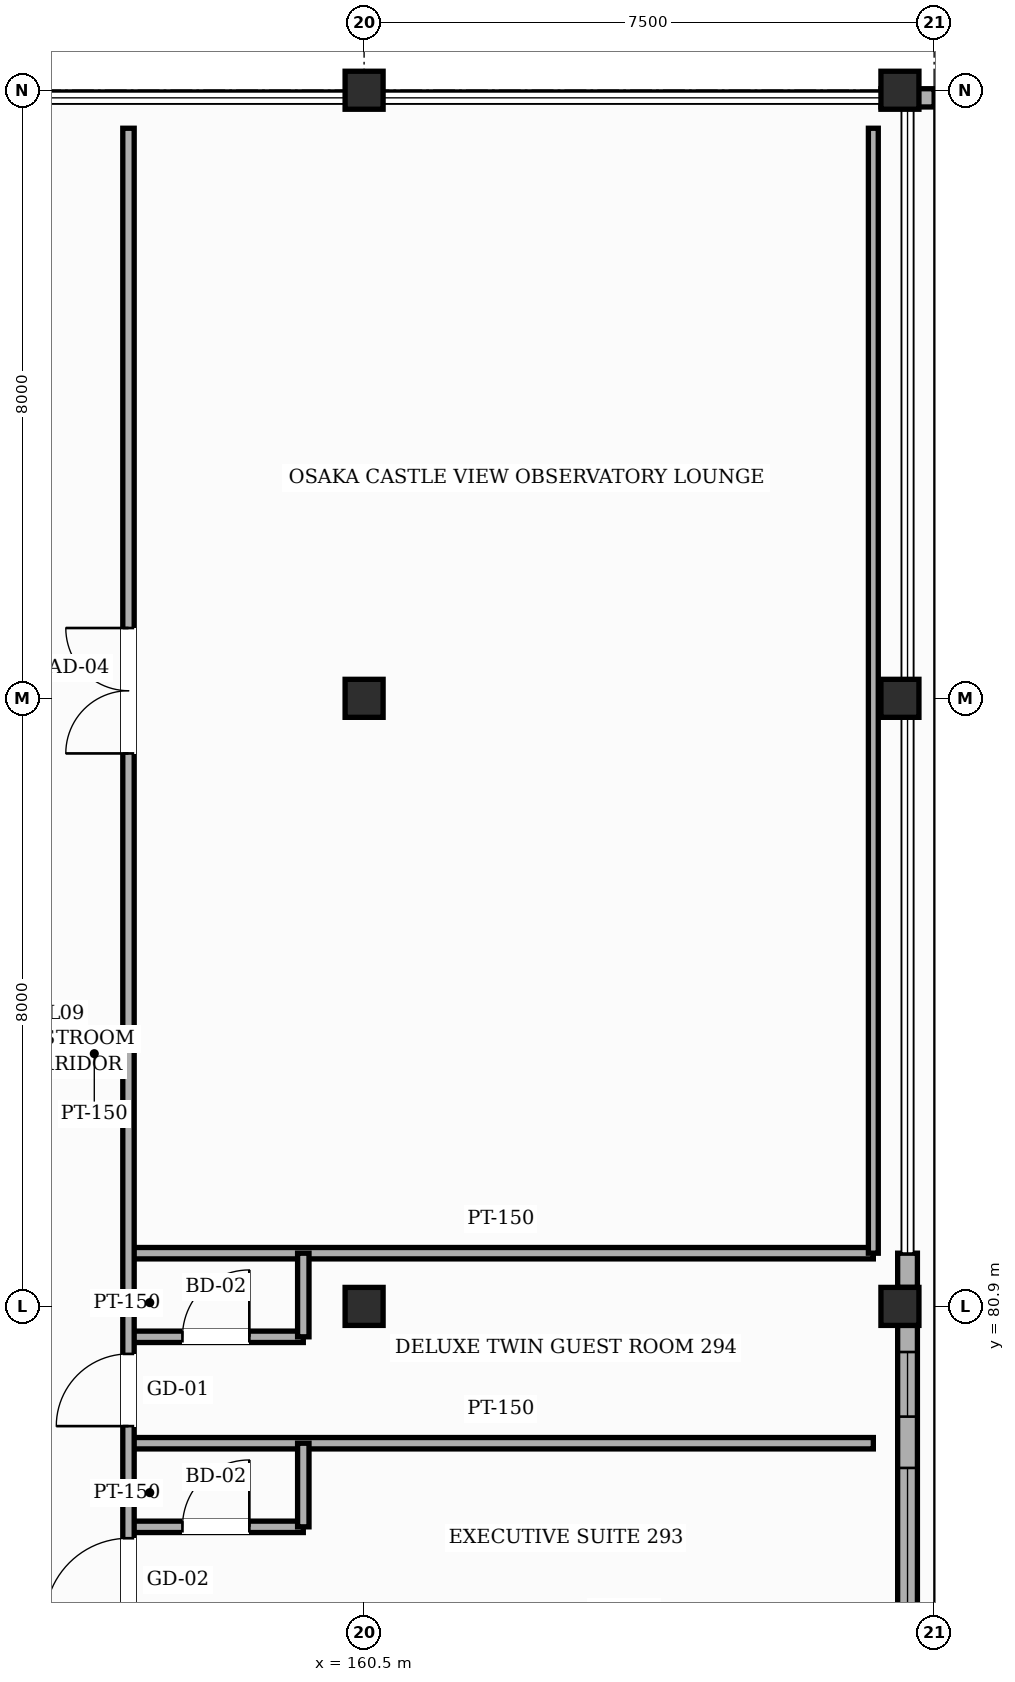
"""IFC4 building model, lengths in metres.
Left out: names, types, materials, properties, quantities, classifications, styles, units other than length and angle.
Written with IfcOpenShell. Run it as: python <this file> out.ifc"""

import sys

from ifc_helpers import new_model, si_unit, direction, frame, frame_2d, origin, origin_2d, place, context, subcontext, project, spatial, rectangle, hollow_rectangle, extrude, element, fill, save


model = new_model("IFC4")
c1 = context("Model", 3, precision=1e-05, world=origin(), true_north=direction((0.0, 1.0)))
c2 = subcontext(c1, "Body", "Model", "MODEL_VIEW")
j1 = project(units=[si_unit("LENGTHUNIT", "METRE"), si_unit("PLANEANGLEUNIT", "RADIAN")], contexts=[c1])
p1 = place(None, origin())
s1 = spatial("IfcSite", under=j1, at=p1, CompositionType="ELEMENT")
p2 = place(p1, origin())
s2 = spatial("IfcBuilding", under=s1, at=p2, CompositionType="ELEMENT")
p3 = place(p2, frame((0.0, 0.0, 39.0)))
s3 = spatial("IfcBuildingStorey", under=s2, at=p3, CompositionType="ELEMENT", Elevation=39.0)
p4 = place(p3, frame((160.5, 80.9, 0.0), z_axis=(0.0, 0.0, 1.0), x_axis=(1.0, 0.0, 0.0)))
e1 = element("IfcColumn", 1, at=p4, inside=s3, PredefinedType="COLUMN", context=c2, shape_type="SweptSolid", body=[
    extrude(hollow_rectangle(XDim=0.5, YDim=0.5, WallThickness=0.022, InnerFilletRadius=0.022, OuterFilletRadius=0.044, at=origin_2d()), origin(), (0.0, 0.0, 1.0), 3.6),
])
for number, where, z_axis, x_axis in (
    (2, (160.5, 88.9, 0.0), (0.0, 0.0, 1.0), (1.0, 0.0, 0.0)),
    (3, (160.5, 96.9, 0.0), (0.0, 0.0, 1.0), (1.0, 0.0, 0.0)),
):
    element("IfcColumn", number, at=place(p3, frame(where, z_axis=z_axis, x_axis=x_axis)), inside=s3, PredefinedType="COLUMN", context=c2, shape_type="SweptSolid", body=[
        extrude(hollow_rectangle(XDim=0.5, YDim=0.5, WallThickness=0.022, InnerFilletRadius=0.022, OuterFilletRadius=0.044, at=origin_2d()), origin(), (0.0, 0.0, 1.0), 3.38),
    ])
p5 = place(p3, frame((167.55, 80.9, 0.0), z_axis=(0.0, 0.0, 1.0), x_axis=(1.0, 0.0, 0.0)))
e4 = element("IfcColumn", 4, at=p5, inside=s3, PredefinedType="COLUMN", context=c2, shape_type="SweptSolid", body=[
    extrude(hollow_rectangle(XDim=0.5, YDim=0.5, WallThickness=0.022, InnerFilletRadius=0.022, OuterFilletRadius=0.044, at=origin_2d()), origin(), (0.0, 0.0, 1.0), 3.6),
])
for number, where, z_axis, x_axis in (
    (5, (167.55, 88.9, 0.0), (0.0, 0.0, 1.0), (1.0, 0.0, 0.0)),
    (6, (167.55, 96.9, 0.0), (0.0, 0.0, 1.0), (1.0, 0.0, 0.0)),
):
    element("IfcColumn", number, at=place(p3, frame(where, z_axis=z_axis, x_axis=x_axis)), inside=s3, PredefinedType="COLUMN", context=c2, shape_type="SweptSolid", body=[
        extrude(hollow_rectangle(XDim=0.5, YDim=0.5, WallThickness=0.022, InnerFilletRadius=0.022, OuterFilletRadius=0.044, at=origin_2d()), origin(), (0.0, 0.0, 1.0), 3.38),
    ])
p6 = place(p3, frame((167.65, 80.65, 0.0), z_axis=(0.0, 0.0, 1.0), x_axis=(0.0, -1.0, 0.0)))
e7 = element("IfcWall", 7, at=p6, inside=s3, PredefinedType="SOLIDWALL", context=c2, shape_type="SweptSolid", body=[
    extrude(rectangle(XDim=4.225, YDim=0.26, at=frame_2d((2.112, 0.0))), origin(), (0.0, 0.0, 1.0), 3.365),
])
p7 = place(p6, frame((1.875, 0.0, 0.85)))
e8 = element("IfcOpeningElement", 8, at=p7, cuts=e7, PredefinedType="OPENING", context=c2, shape_type="SweptSolid", body=[
    extrude(rectangle(XDim=1.85, YDim=1.5, at=frame_2d((0.925, 0.75))), frame((0.0, 0.14, 0.0), z_axis=(0.0, -1.0, 0.0), x_axis=(1.0, 0.0, 0.0)), (0.0, 0.0, 1.0), 0.28),
])
p8 = place(p6, frame((0.35, 0.0, 0.85)))
e9 = element("IfcOpeningElement", 9, at=p8, cuts=e7, PredefinedType="OPENING", context=c2, shape_type="SweptSolid", body=[
    extrude(rectangle(XDim=0.85, YDim=1.35, at=frame_2d((0.425, 0.675))), frame((0.0, 0.14, 0.0), z_axis=(0.0, -1.0, 0.0), x_axis=(1.0, 0.0, 0.0)), (0.0, 0.0, 1.0), 0.28),
])
p9 = place(p3, frame((167.65, 81.6, 0.0), z_axis=(0.0, 0.0, 1.0), x_axis=(0.0, -1.0, 0.0)))
e10 = element("IfcWall", 10, at=p9, inside=s3, PredefinedType="SOLIDWALL", context=c2, shape_type="SweptSolid", body=[
    extrude(rectangle(XDim=0.45, YDim=0.26, at=frame_2d((0.225, 0.0))), origin(), (0.0, 0.0, 1.0), 2.755),
])
p10 = place(p3, frame((167.3, 96.8, 0.0), z_axis=(0.0, 0.0, 1.0), x_axis=(1.0, 0.0, 0.0)))
e11 = element("IfcWall", 11, at=p10, inside=s3, PredefinedType="SOLIDWALL", context=c2, shape_type="SweptSolid", body=[
    extrude(rectangle(XDim=0.7, YDim=0.24, at=frame_2d((0.35, 0.0))), origin(), (0.0, 0.0, 1.0), 3.365),
])
p11 = place(p3, frame((157.4, 78.0, 0.0), z_axis=(0.0, 0.0, 1.0), x_axis=(1.0, 0.0, 0.0)))
e12 = element("IfcWall", 12, at=p11, inside=s3, PredefinedType="PARTITIONING", context=c2, shape_type="SweptSolid", body=[
    extrude(rectangle(XDim=2.3, YDim=0.15, at=frame_2d((1.15, 0.0))), origin(), (0.0, 0.0, 1.0), 3.365),
])
p12 = place(p11, frame((0.71, 0.0, 0.0)))
e13 = element("IfcOpeningElement", 13, at=p12, cuts=e12, PredefinedType="OPENING", context=c2, shape_type="SweptSolid", body=[
    extrude(rectangle(XDim=0.88, YDim=2.12, at=frame_2d((0.44, 1.06))), frame((0.0, 0.085, 0.0), z_axis=(0.0, -1.0, 0.0), x_axis=(1.0, 0.0, 0.0)), (0.0, 0.0, 1.0), 0.17),
])
p13 = place(p3, frame((157.4, 79.1, 0.0), z_axis=(0.0, 0.0, 1.0), x_axis=(1.0, 0.0, 0.0)))
e14 = element("IfcWall", 14, at=p13, inside=s3, PredefinedType="PARTITIONING", context=c2, shape_type="SweptSolid", body=[
    extrude(rectangle(XDim=9.8, YDim=0.15, at=frame_2d((4.9, 0.0))), origin(), (0.0, 0.0, 1.0), 3.365),
])
p14 = place(p3, frame((157.4, 80.5, 0.0), z_axis=(0.0, 0.0, 1.0), x_axis=(1.0, 0.0, 0.0)))
e15 = element("IfcWall", 15, at=p14, inside=s3, PredefinedType="PARTITIONING", context=c2, shape_type="SweptSolid", body=[
    extrude(rectangle(XDim=2.3, YDim=0.15, at=frame_2d((1.15, 0.0))), origin(), (0.0, 0.0, 1.0), 3.365),
])
p15 = place(p14, frame((0.71, 0.0, 0.0)))
e16 = element("IfcOpeningElement", 16, at=p15, cuts=e15, PredefinedType="OPENING", context=c2, shape_type="SweptSolid", body=[
    extrude(rectangle(XDim=0.88, YDim=2.12, at=frame_2d((0.44, 1.06))), frame((0.0, 0.085, 0.0), z_axis=(0.0, -1.0, 0.0), x_axis=(1.0, 0.0, 0.0)), (0.0, 0.0, 1.0), 0.17),
])
p16 = place(p3, frame((157.4, 81.6, 0.0), z_axis=(0.0, 0.0, 1.0), x_axis=(1.0, 0.0, 0.0)))
e17 = element("IfcWall", 17, at=p16, inside=s3, PredefinedType="PARTITIONING", context=c2, shape_type="SweptSolid", body=[
    extrude(rectangle(XDim=9.8, YDim=0.15, at=frame_2d((4.9, 0.0))), origin(), (0.0, 0.0, 1.0), 3.365),
])
p17 = place(p3, frame((157.4, 76.6, 0.0), z_axis=(0.0, 0.0, 1.0), x_axis=(0.0, 1.0, 0.0)))
e18 = element("IfcWall", 18, at=p17, inside=s3, PredefinedType="PARTITIONING", context=c2, shape_type="SweptSolid", body=[
    extrude(rectangle(XDim=19.8, YDim=0.15, at=frame_2d((9.9, 0.0))), origin(), (0.0, 0.0, 1.0), 3.365),
])
p18 = place(p17, frame((11.575, 0.0, 0.0)))
e19 = element("IfcOpeningElement", 19, at=p18, cuts=e18, PredefinedType="OPENING", context=c2, shape_type="SweptSolid", body=[
    extrude(rectangle(XDim=1.65, YDim=2.35, at=frame_2d((0.825, 1.175))), frame((0.0, 0.085, 0.0), z_axis=(0.0, -1.0, 0.0), x_axis=(1.0, 0.0, 0.0)), (0.0, 0.0, 1.0), 0.17),
])
p19 = place(p17, frame((0.15, 0.0, 0.0)))
e20 = element("IfcOpeningElement", 20, at=p19, cuts=e18, PredefinedType="OPENING", context=c2, shape_type="SweptSolid", body=[
    extrude(rectangle(XDim=1.1, YDim=2.2, at=frame_2d((0.55, 1.1))), frame((0.0, 0.085, 0.0), z_axis=(0.0, -1.0, 0.0), x_axis=(1.0, 0.0, 0.0)), (0.0, 0.0, 1.0), 0.17),
])
p20 = place(p17, frame((2.725, 0.0, 0.0)))
e21 = element("IfcOpeningElement", 21, at=p20, cuts=e18, PredefinedType="OPENING", context=c2, shape_type="SweptSolid", body=[
    extrude(rectangle(XDim=0.95, YDim=2.15, at=frame_2d((0.475, 1.075))), frame((0.0, 0.085, 0.0), z_axis=(0.0, -1.0, 0.0), x_axis=(1.0, 0.0, 0.0)), (0.0, 0.0, 1.0), 0.17),
])
for number, where, z_axis, x_axis in (
    (22, (159.7, 78.0, 0.0), (0.0, 0.0, 1.0), (0.0, 1.0, 0.0)),
    (23, (159.7, 80.5, 0.0), (0.0, 0.0, 1.0), (0.0, 1.0, 0.0)),
):
    element("IfcWall", number, at=place(p3, frame(where, z_axis=z_axis, x_axis=x_axis)), inside=s3, PredefinedType="PARTITIONING", context=c2, shape_type="SweptSolid", body=[
        extrude(rectangle(XDim=1.1, YDim=0.15, at=frame_2d((0.55, 0.0))), origin(), (0.0, 0.0, 1.0), 3.365),
    ])
p21 = place(p3, frame((167.2, 81.6, 0.0), z_axis=(0.0, 0.0, 1.0), x_axis=(0.0, 1.0, 0.0)))
e24 = element("IfcWall", 24, at=p21, inside=s3, PredefinedType="PARTITIONING", context=c2, shape_type="SweptSolid", body=[
    extrude(rectangle(XDim=14.8, YDim=0.13, at=frame_2d((7.4, 0.0))), origin(), (0.0, 0.0, 1.0), 3.365),
])
p22 = place(p7, origin())
e25 = element("IfcWindow", 25, at=p22, inside=s3, PartitioningType="SINGLE_PANEL", PredefinedType="WINDOW", context=c2, shape_type="SweptSolid", body=[
    extrude(rectangle(XDim=1.85, YDim=1.5, at=frame_2d((0.925, 0.75))), frame((0.0, 0.03, 0.0), z_axis=(0.0, -1.0, 0.0), x_axis=(1.0, 0.0, 0.0)), (0.0, 0.0, 1.0), 0.06),
])
fill(e8, e25)
p23 = place(p8, origin())
e26 = element("IfcWindow", 26, at=p23, inside=s3, PartitioningType="SINGLE_PANEL", PredefinedType="WINDOW", context=c2, shape_type="SweptSolid", body=[
    extrude(rectangle(XDim=0.85, YDim=1.35, at=frame_2d((0.425, 0.675))), frame((0.0, 0.03, 0.0), z_axis=(0.0, -1.0, 0.0), x_axis=(1.0, 0.0, 0.0)), (0.0, 0.0, 1.0), 0.06),
])
fill(e9, e26)
p24 = place(p18, origin())
e27 = element("IfcDoor", 27, at=p24, inside=s3, OperationType="DOUBLE_DOOR_SINGLE_SWING", PredefinedType="DOOR", context=c2, shape_type="SweptSolid", body=[
    extrude(rectangle(XDim=1.65, YDim=2.35, at=frame_2d((0.825, 1.175))), frame((0.0, 0.025, 0.0), z_axis=(0.0, -1.0, 0.0), x_axis=(1.0, 0.0, 0.0)), (0.0, 0.0, 1.0), 0.05),
])
fill(e19, e27)
p25 = place(p19, origin())
e28 = element("IfcDoor", 28, at=p25, inside=s3, OperationType="SINGLE_SWING_LEFT", PredefinedType="DOOR", context=c2, shape_type="SweptSolid", body=[
    extrude(rectangle(XDim=1.1, YDim=2.2, at=frame_2d((0.55, 1.1))), frame((0.0, 0.025, 0.0), z_axis=(0.0, -1.0, 0.0), x_axis=(1.0, 0.0, 0.0)), (0.0, 0.0, 1.0), 0.05),
])
fill(e20, e28)
p26 = place(p12, origin())
e29 = element("IfcDoor", 29, at=p26, inside=s3, OperationType="SINGLE_SWING_RIGHT", PredefinedType="DOOR", context=c2, shape_type="SweptSolid", body=[
    extrude(rectangle(XDim=0.88, YDim=2.12, at=frame_2d((0.44, 1.06))), frame((0.0, 0.025, 0.0), z_axis=(0.0, -1.0, 0.0), x_axis=(1.0, 0.0, 0.0)), (0.0, 0.0, 1.0), 0.05),
])
fill(e13, e29)
p27 = place(p20, origin())
e30 = element("IfcDoor", 30, at=p27, inside=s3, OperationType="SINGLE_SWING_LEFT", PredefinedType="DOOR", context=c2, shape_type="SweptSolid", body=[
    extrude(rectangle(XDim=0.95, YDim=2.15, at=frame_2d((0.475, 1.075))), frame((0.0, 0.025, 0.0), z_axis=(0.0, -1.0, 0.0), x_axis=(1.0, 0.0, 0.0)), (0.0, 0.0, 1.0), 0.05),
])
fill(e21, e30)
p28 = place(p15, origin())
e31 = element("IfcDoor", 31, at=p28, inside=s3, OperationType="SINGLE_SWING_RIGHT", PredefinedType="DOOR", context=c2, shape_type="SweptSolid", body=[
    extrude(rectangle(XDim=0.88, YDim=2.12, at=frame_2d((0.44, 1.06))), frame((0.0, 0.025, 0.0), z_axis=(0.0, -1.0, 0.0), x_axis=(1.0, 0.0, 0.0)), (0.0, 0.0, 1.0), 0.05),
])
fill(e16, e31)
save(model, sys.argv[1])
